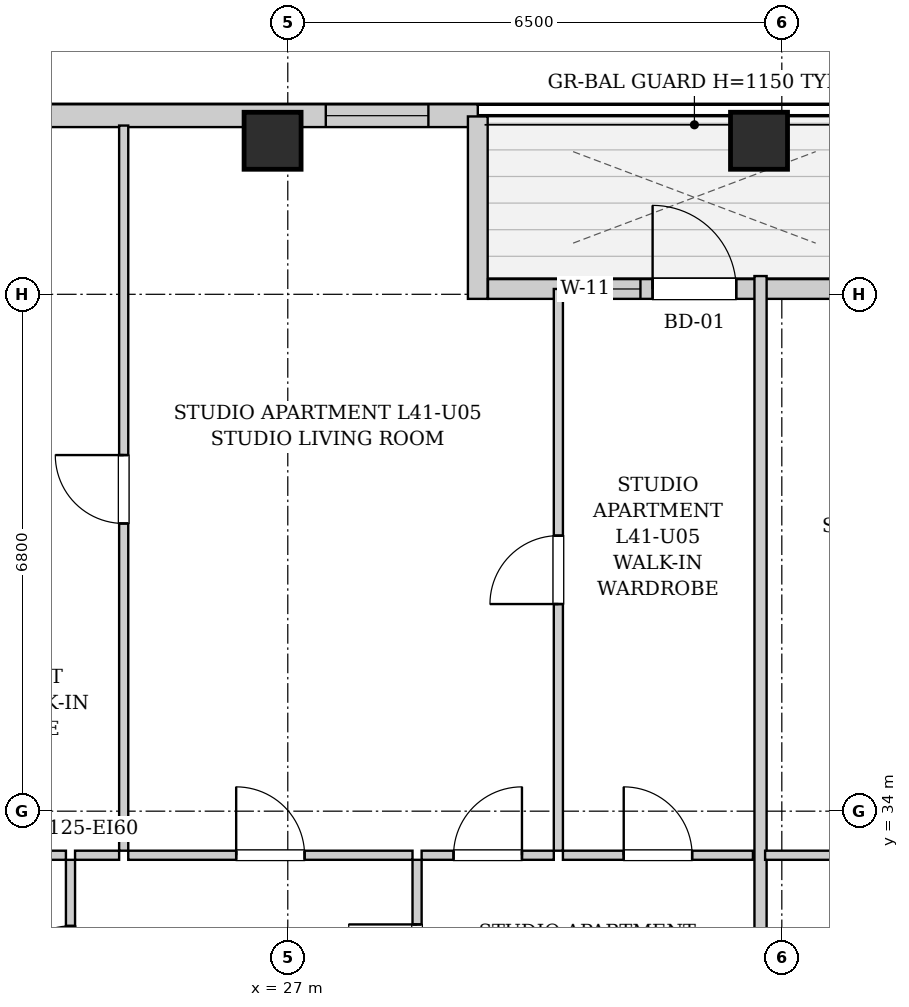
"""IFC4 building model, lengths in metres.
Left out: names, types, materials, properties, quantities, classifications, styles, units other than length and angle.
Written with IfcOpenShell. Run it as: python <this file> out.ifc"""

import sys

from ifc_helpers import new_model, si_unit, direction, frame, frame_2d, origin, origin_2d, place, context, subcontext, project, spatial, rectangle, extrude, element, fill, save


model = new_model("IFC4")
c1 = context("Model", 3, precision=1e-05, world=origin(), true_north=direction((0.0, 1.0)))
c2 = subcontext(c1, "Body", "Model", "MODEL_VIEW")
j1 = project(units=[si_unit("LENGTHUNIT", "METRE"), si_unit("PLANEANGLEUNIT", "RADIAN")], contexts=[c1])
p1 = place(None, origin())
s1 = spatial("IfcSite", under=j1, at=p1, CompositionType="ELEMENT")
p2 = place(p1, origin())
s2 = spatial("IfcBuilding", under=s1, at=p2, CompositionType="ELEMENT")
p3 = place(p2, frame((0.0, 0.0, 143.9)))
s3 = spatial("IfcBuildingStorey", under=s2, at=p3, CompositionType="ELEMENT", Elevation=143.9)
for number, where, z_axis, x_axis in (
    (1, (26.8, 42.82, 0.0), (0.0, 0.0, 1.0), (1.0, 0.0, 0.0)),
    (2, (33.2, 42.82, 0.0), (0.0, 0.0, 1.0), (1.0, 0.0, 0.0)),
):
    element("IfcColumn", number, at=place(p3, frame(where, z_axis=z_axis, x_axis=x_axis)), inside=s3, PredefinedType="COLUMN", context=c2, shape_type="SweptSolid", body=[
        extrude(rectangle(XDim=0.75, YDim=0.75, at=origin_2d()), origin(), (0.0, 0.0, 1.0), 3.25),
    ])
p4 = place(p3, frame((10.0, 43.15, 0.0), z_axis=(0.0, 0.0, 1.0), x_axis=(1.0, 0.0, 0.0)))
e3 = element("IfcWall", 3, at=p4, inside=s3, PredefinedType="SOLIDWALL", context=c2, shape_type="SweptSolid", body=[
    extrude(rectangle(XDim=19.5, YDim=0.3, at=frame_2d((9.75, 0.0))), origin(), (0.0, 0.0, 1.0), 2.99),
])
p5 = place(p4, frame((2.315, 0.0, 0.55)))
e4 = element("IfcOpeningElement", 4, at=p5, cuts=e3, PredefinedType="OPENING", context=c2, shape_type="SweptSolid", body=[
    extrude(rectangle(XDim=1.35, YDim=1.2, at=frame_2d((0.675, 0.6))), frame((0.0, 0.16, 0.0), z_axis=(0.0, -1.0, 0.0), x_axis=(1.0, 0.0, 0.0)), (0.0, 0.0, 1.0), 0.32),
])
p6 = place(p4, frame((4.735, 0.0, 0.55)))
e5 = element("IfcOpeningElement", 5, at=p6, cuts=e3, PredefinedType="OPENING", context=c2, shape_type="SweptSolid", body=[
    extrude(rectangle(XDim=1.35, YDim=1.2, at=frame_2d((0.675, 0.6))), frame((0.0, 0.16, 0.0), z_axis=(0.0, -1.0, 0.0), x_axis=(1.0, 0.0, 0.0)), (0.0, 0.0, 1.0), 0.32),
])
p7 = place(p4, frame((8.625, 0.0, 0.55)))
e6 = element("IfcOpeningElement", 6, at=p7, cuts=e3, PredefinedType="OPENING", context=c2, shape_type="SweptSolid", body=[
    extrude(rectangle(XDim=1.35, YDim=1.2, at=frame_2d((0.675, 0.6))), frame((0.0, 0.16, 0.0), z_axis=(0.0, -1.0, 0.0), x_axis=(1.0, 0.0, 0.0)), (0.0, 0.0, 1.0), 0.32),
])
p8 = place(p4, frame((17.5, 0.0, 0.55)))
e7 = element("IfcOpeningElement", 7, at=p8, cuts=e3, PredefinedType="OPENING", context=c2, shape_type="SweptSolid", body=[
    extrude(rectangle(XDim=1.35, YDim=1.2, at=frame_2d((0.675, 0.6))), frame((0.0, 0.16, 0.0), z_axis=(0.0, -1.0, 0.0), x_axis=(1.0, 0.0, 0.0)), (0.0, 0.0, 1.0), 0.32),
])
p9 = place(p3, frame((29.5, 43.14, 0.0), z_axis=(0.0, 0.0, 1.0), x_axis=(0.0, -1.0, 0.0)))
e8 = element("IfcWall", 8, at=p9, inside=s3, PredefinedType="SOLIDWALL", context=c2, shape_type="SweptSolid", body=[
    extrude(rectangle(XDim=2.4, YDim=0.26, at=frame_2d((1.2, 0.0))), origin(), (0.0, 0.0, 1.0), 2.99),
])
p10 = place(p3, frame((29.634, 40.87, 0.0), z_axis=(0.0, 0.0, 1.0), x_axis=(1.0, 0.0, 0.0)))
e9 = element("IfcWall", 9, at=p10, inside=s3, PredefinedType="SOLIDWALL", context=c2, shape_type="SweptSolid", body=[
    extrude(rectangle(XDim=5.432, YDim=0.26, at=frame_2d((2.716, 0.0))), origin(), (0.0, 0.0, 1.0), 2.99),
])
p11 = place(p10, frame((2.166, 0.0, 0.0)))
e10 = element("IfcOpeningElement", 10, at=p11, cuts=e9, PredefinedType="OPENING", context=c2, shape_type="SweptSolid", body=[
    extrude(rectangle(XDim=1.1, YDim=2.0, at=frame_2d((0.55, 1.0))), frame((0.0, 0.14, 0.0), z_axis=(0.0, -1.0, 0.0), x_axis=(1.0, 0.0, 0.0)), (0.0, 0.0, 1.0), 0.28),
])
p12 = place(p10, frame((1.156, 0.0, 0.55)))
e11 = element("IfcOpeningElement", 11, at=p12, cuts=e9, PredefinedType="OPENING", context=c2, shape_type="SweptSolid", body=[
    extrude(rectangle(XDim=0.85, YDim=1.2, at=frame_2d((0.425, 0.6))), frame((0.0, 0.14, 0.0), z_axis=(0.0, -1.0, 0.0), x_axis=(1.0, 0.0, 0.0)), (0.0, 0.0, 1.0), 0.28),
])
p13 = place(p3, frame((24.141, 30.76, 0.0), z_axis=(0.0, 0.0, 1.0), x_axis=(0.0, 1.0, 0.0)))
e12 = element("IfcWall", 12, at=p13, inside=s3, PredefinedType="PARTITIONING", context=c2, shape_type="SweptSolid", body=[
    extrude(rectangle(XDim=2.6, YDim=0.12, at=frame_2d((1.3, 0.0))), origin(), (0.0, 0.0, 1.0), 2.99),
])
p14 = place(p13, frame((0.87, 0.0, 0.0)))
e13 = element("IfcOpeningElement", 13, at=p14, cuts=e12, PredefinedType="OPENING", context=c2, shape_type="SweptSolid", body=[
    extrude(rectangle(XDim=0.86, YDim=2.05, at=frame_2d((0.43, 1.025))), frame((0.0, 0.07, 0.0), z_axis=(0.0, -1.0, 0.0), x_axis=(1.0, 0.0, 0.0)), (0.0, 0.0, 1.0), 0.14),
])
p15 = place(p3, frame((21.681, 33.42, 0.0), z_axis=(0.0, 0.0, 1.0), x_axis=(1.0, 0.0, 0.0)))
e14 = element("IfcWall", 14, at=p15, inside=s3, PredefinedType="PARTITIONING", context=c2, shape_type="SweptSolid", body=[
    extrude(rectangle(XDim=2.4, YDim=0.12, at=frame_2d((1.2, 0.0))), origin(), (0.0, 0.0, 1.0), 2.99),
])
p16 = place(p3, frame((28.701, 30.76, 0.0), z_axis=(0.0, 0.0, 1.0), x_axis=(0.0, 1.0, 0.0)))
e15 = element("IfcWall", 15, at=p16, inside=s3, PredefinedType="PARTITIONING", context=c2, shape_type="SweptSolid", body=[
    extrude(rectangle(XDim=2.6, YDim=0.12, at=frame_2d((1.3, 0.0))), origin(), (0.0, 0.0, 1.0), 2.99),
])
p17 = place(p16, frame((0.85, 0.0, 0.0)))
e16 = element("IfcOpeningElement", 16, at=p17, cuts=e15, PredefinedType="OPENING", context=c2, shape_type="SweptSolid", body=[
    extrude(rectangle(XDim=0.9, YDim=2.05, at=frame_2d((0.45, 1.025))), frame((0.0, 0.07, 0.0), z_axis=(0.0, -1.0, 0.0), x_axis=(1.0, 0.0, 0.0)), (0.0, 0.0, 1.0), 0.14),
])
p18 = place(p3, frame((24.201, 33.42, 0.0), z_axis=(0.0, 0.0, 1.0), x_axis=(1.0, 0.0, 0.0)))
e17 = element("IfcWall", 17, at=p18, inside=s3, PredefinedType="PARTITIONING", context=c2, shape_type="SweptSolid", body=[
    extrude(rectangle(XDim=0.58, YDim=0.12, at=frame_2d((0.29, 0.0))), origin(), (0.0, 0.0, 1.0), 2.99),
])
p19 = place(p3, frame((24.901, 33.42, 0.0), z_axis=(0.0, 0.0, 1.0), x_axis=(1.0, 0.0, 0.0)))
e18 = element("IfcWall", 18, at=p19, inside=s3, PredefinedType="PARTITIONING", context=c2, shape_type="SweptSolid", body=[
    extrude(rectangle(XDim=3.74, YDim=0.12, at=frame_2d((1.87, 0.0))), origin(), (0.0, 0.0, 1.0), 2.99),
])
p20 = place(p19, frame((1.42, 0.0, 0.0)))
e19 = element("IfcOpeningElement", 19, at=p20, cuts=e18, PredefinedType="OPENING", context=c2, shape_type="SweptSolid", body=[
    extrude(rectangle(XDim=0.9, YDim=2.05, at=frame_2d((0.45, 1.025))), frame((0.0, 0.07, 0.0), z_axis=(0.0, -1.0, 0.0), x_axis=(1.0, 0.0, 0.0)), (0.0, 0.0, 1.0), 0.14),
])
p21 = place(p3, frame((28.761, 33.42, 0.0), z_axis=(0.0, 0.0, 1.0), x_axis=(1.0, 0.0, 0.0)))
e20 = element("IfcWall", 20, at=p21, inside=s3, PredefinedType="PARTITIONING", context=c2, shape_type="SweptSolid", body=[
    extrude(rectangle(XDim=1.739, YDim=0.12, at=frame_2d((0.87, 0.0))), origin(), (0.0, 0.0, 1.0), 2.99),
])
p22 = place(p21, frame((0.42, 0.0, 0.0)))
e21 = element("IfcOpeningElement", 21, at=p22, cuts=e20, PredefinedType="OPENING", context=c2, shape_type="SweptSolid", body=[
    extrude(rectangle(XDim=0.9, YDim=2.05, at=frame_2d((0.45, 1.025))), frame((0.0, 0.07, 0.0), z_axis=(0.0, -1.0, 0.0), x_axis=(1.0, 0.0, 0.0)), (0.0, 0.0, 1.0), 0.14),
])
p23 = place(p3, frame((30.62, 33.42, 0.0), z_axis=(0.0, 0.0, 1.0), x_axis=(1.0, 0.0, 0.0)))
e22 = element("IfcWall", 22, at=p23, inside=s3, PredefinedType="PARTITIONING", context=c2, shape_type="SweptSolid", body=[
    extrude(rectangle(XDim=2.5, YDim=0.12, at=frame_2d((1.25, 0.0))), origin(), (0.0, 0.0, 1.0), 2.99),
])
p24 = place(p23, frame((0.8, 0.0, 0.0)))
e23 = element("IfcOpeningElement", 23, at=p24, cuts=e22, PredefinedType="OPENING", context=c2, shape_type="SweptSolid", body=[
    extrude(rectangle(XDim=0.9, YDim=2.05, at=frame_2d((0.45, 1.025))), frame((0.0, 0.07, 0.0), z_axis=(0.0, -1.0, 0.0), x_axis=(1.0, 0.0, 0.0)), (0.0, 0.0, 1.0), 0.14),
])
p25 = place(p3, frame((24.841, 33.48, 0.0), z_axis=(0.0, 0.0, 1.0), x_axis=(0.0, 1.0, 0.0)))
e24 = element("IfcWall", 24, at=p25, inside=s3, PredefinedType="PARTITIONING", context=c2, shape_type="SweptSolid", body=[
    extrude(rectangle(XDim=9.54, YDim=0.12, at=frame_2d((4.77, 0.0))), origin(), (0.0, 0.0, 1.0), 2.99),
])
p26 = place(p25, frame((4.305, 0.0, 0.0)))
e25 = element("IfcOpeningElement", 25, at=p26, cuts=e24, PredefinedType="OPENING", context=c2, shape_type="SweptSolid", body=[
    extrude(rectangle(XDim=0.9, YDim=2.05, at=frame_2d((0.45, 1.025))), frame((0.0, 0.07, 0.0), z_axis=(0.0, -1.0, 0.0), x_axis=(1.0, 0.0, 0.0)), (0.0, 0.0, 1.0), 0.14),
])
p27 = place(p3, frame((30.56, 33.48, 0.0), z_axis=(0.0, 0.0, 1.0), x_axis=(0.0, 1.0, 0.0)))
e26 = element("IfcWall", 26, at=p27, inside=s3, PredefinedType="PARTITIONING", context=c2, shape_type="SweptSolid", body=[
    extrude(rectangle(XDim=7.39, YDim=0.12, at=frame_2d((3.695, 0.0))), origin(), (0.0, 0.0, 1.0), 2.99),
])
p28 = place(p27, frame((3.245, 0.0, 0.0)))
e27 = element("IfcOpeningElement", 27, at=p28, cuts=e26, PredefinedType="OPENING", context=c2, shape_type="SweptSolid", body=[
    extrude(rectangle(XDim=0.9, YDim=2.05, at=frame_2d((0.45, 1.025))), frame((0.0, 0.07, 0.0), z_axis=(0.0, -1.0, 0.0), x_axis=(1.0, 0.0, 0.0)), (0.0, 0.0, 1.0), 0.14),
])
p29 = place(p3, frame((33.22, 30.76, 0.0), z_axis=(0.0, 0.0, 1.0), x_axis=(0.0, 1.0, 0.0)))
e28 = element("IfcWall", 28, at=p29, inside=s3, PredefinedType="PARTITIONING", context=c2, shape_type="SweptSolid", body=[
    extrude(rectangle(XDim=10.28, YDim=0.16, at=frame_2d((5.14, 0.0))), origin(), (0.0, 0.0, 1.0), 2.426),
])
p30 = place(p3, frame((33.28, 33.42, 0.0), z_axis=(0.0, 0.0, 1.0), x_axis=(1.0, 0.0, 0.0)))
e29 = element("IfcWall", 29, at=p30, inside=s3, PredefinedType="PARTITIONING", context=c2, shape_type="SweptSolid", body=[
    extrude(rectangle(XDim=1.85, YDim=0.12, at=frame_2d((0.925, 0.0))), origin(), (0.0, 0.0, 1.0), 2.99),
])
p31 = place(p14, origin())
e30 = element("IfcDoor", 30, at=p31, inside=s3, OperationType="SINGLE_SWING_LEFT", PredefinedType="DOOR", context=c2, shape_type="SweptSolid", body=[
    extrude(rectangle(XDim=0.86, YDim=2.05, at=frame_2d((0.43, 1.025))), frame((0.0, 0.025, 0.0), z_axis=(0.0, -1.0, 0.0), x_axis=(1.0, 0.0, 0.0)), (0.0, 0.0, 1.0), 0.05),
])
fill(e13, e30)
p32 = place(p17, origin())
e31 = element("IfcDoor", 31, at=p32, inside=s3, OperationType="SINGLE_SWING_RIGHT", PredefinedType="DOOR", context=c2, shape_type="SweptSolid", body=[
    extrude(rectangle(XDim=0.9, YDim=2.05, at=frame_2d((0.45, 1.025))), frame((0.0, 0.025, 0.0), z_axis=(0.0, -1.0, 0.0), x_axis=(1.0, 0.0, 0.0)), (0.0, 0.0, 1.0), 0.05),
])
fill(e16, e31)
p33 = place(p20, origin())
e32 = element("IfcDoor", 32, at=p33, inside=s3, OperationType="SINGLE_SWING_LEFT", PredefinedType="DOOR", context=c2, shape_type="SweptSolid", body=[
    extrude(rectangle(XDim=0.9, YDim=2.05, at=frame_2d((0.45, 1.025))), frame((0.0, 0.025, 0.0), z_axis=(0.0, -1.0, 0.0), x_axis=(1.0, 0.0, 0.0)), (0.0, 0.0, 1.0), 0.05),
])
fill(e19, e32)
p34 = place(p22, origin())
e33 = element("IfcDoor", 33, at=p34, inside=s3, OperationType="SINGLE_SWING_RIGHT", PredefinedType="DOOR", context=c2, shape_type="SweptSolid", body=[
    extrude(rectangle(XDim=0.9, YDim=2.05, at=frame_2d((0.45, 1.025))), frame((0.0, 0.025, 0.0), z_axis=(0.0, -1.0, 0.0), x_axis=(1.0, 0.0, 0.0)), (0.0, 0.0, 1.0), 0.05),
])
fill(e21, e33)
p35 = place(p24, origin())
e34 = element("IfcDoor", 34, at=p35, inside=s3, OperationType="SINGLE_SWING_LEFT", PredefinedType="DOOR", context=c2, shape_type="SweptSolid", body=[
    extrude(rectangle(XDim=0.9, YDim=2.05, at=frame_2d((0.45, 1.025))), frame((0.0, 0.025, 0.0), z_axis=(0.0, -1.0, 0.0), x_axis=(1.0, 0.0, 0.0)), (0.0, 0.0, 1.0), 0.05),
])
fill(e23, e34)
p36 = place(p26, origin())
e35 = element("IfcDoor", 35, at=p36, inside=s3, OperationType="SINGLE_SWING_RIGHT", PredefinedType="DOOR", context=c2, shape_type="SweptSolid", body=[
    extrude(rectangle(XDim=0.9, YDim=2.05, at=frame_2d((0.45, 1.025))), frame((0.0, 0.025, 0.0), z_axis=(0.0, -1.0, 0.0), x_axis=(1.0, 0.0, 0.0)), (0.0, 0.0, 1.0), 0.05),
])
fill(e25, e35)
p37 = place(p28, origin())
e36 = element("IfcDoor", 36, at=p37, inside=s3, OperationType="SINGLE_SWING_LEFT", PredefinedType="DOOR", context=c2, shape_type="SweptSolid", body=[
    extrude(rectangle(XDim=0.9, YDim=2.05, at=frame_2d((0.45, 1.025))), frame((0.0, 0.025, 0.0), z_axis=(0.0, -1.0, 0.0), x_axis=(1.0, 0.0, 0.0)), (0.0, 0.0, 1.0), 0.05),
])
fill(e27, e36)
p38 = place(p11, origin())
e37 = element("IfcDoor", 37, at=p38, inside=s3, OperationType="SINGLE_SWING_LEFT", PredefinedType="DOOR", context=c2, shape_type="SweptSolid", body=[
    extrude(rectangle(XDim=1.1, YDim=2.0, at=frame_2d((0.55, 1.0))), frame((0.0, 0.025, 0.0), z_axis=(0.0, -1.0, 0.0), x_axis=(1.0, 0.0, 0.0)), (0.0, 0.0, 1.0), 0.05),
])
fill(e10, e37)
p39 = place(p8, origin())
e38 = element("IfcWindow", 38, at=p39, inside=s3, PartitioningType="SINGLE_PANEL", PredefinedType="WINDOW", context=c2, shape_type="SweptSolid", body=[
    extrude(rectangle(XDim=1.35, YDim=1.2, at=frame_2d((0.675, 0.6))), frame((0.0, 0.03, 0.0), z_axis=(0.0, -1.0, 0.0), x_axis=(1.0, 0.0, 0.0)), (0.0, 0.0, 1.0), 0.06),
])
fill(e7, e38)
p40 = place(p12, origin())
e39 = element("IfcWindow", 39, at=p40, inside=s3, PartitioningType="SINGLE_PANEL", PredefinedType="WINDOW", context=c2, shape_type="SweptSolid", body=[
    extrude(rectangle(XDim=0.85, YDim=1.2, at=frame_2d((0.425, 0.6))), frame((0.0, 0.03, 0.0), z_axis=(0.0, -1.0, 0.0), x_axis=(1.0, 0.0, 0.0)), (0.0, 0.0, 1.0), 0.06),
])
fill(e11, e39)
save(model, sys.argv[1])
